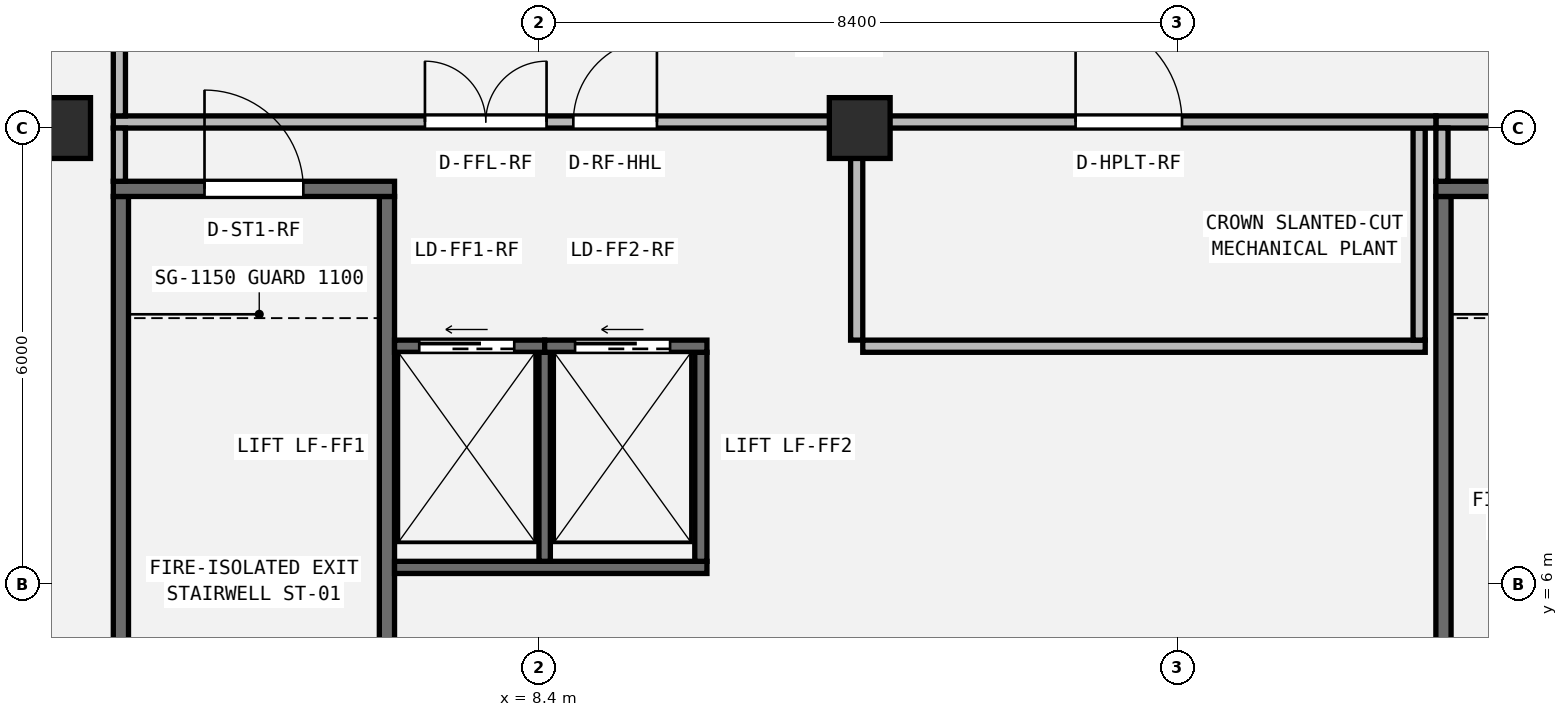
"""IFC4 building model, lengths in metres.
Left out: names, types, materials, properties, quantities, classifications, styles, units other than length and angle.
Written with IfcOpenShell. Run it as: python <this file> out.ifc"""

import sys

from ifc_helpers import new_model, si_unit, direction, frame, frame_2d, origin, origin_2d, place, context, subcontext, project, spatial, rectangle, extrude, element, fill, save


model = new_model("IFC4")
c1 = context("Model", 3, precision=1e-05, world=origin(), true_north=direction((0.0, 1.0)))
c2 = subcontext(c1, "Body", "Model", "MODEL_VIEW")
j1 = project(units=[si_unit("LENGTHUNIT", "METRE"), si_unit("PLANEANGLEUNIT", "RADIAN")], contexts=[c1])
p1 = place(None, origin())
s1 = spatial("IfcSite", under=j1, at=p1, CompositionType="ELEMENT")
p2 = place(p1, origin())
s2 = spatial("IfcBuilding", under=s1, at=p2, CompositionType="ELEMENT")
p3 = place(p2, frame((0.0, 0.0, 309.2)))
s3 = spatial("IfcBuildingStorey", under=s2, at=p3, CompositionType="ELEMENT", Elevation=309.2)
p4 = place(p3, frame((2.1, 12.0, 0.0), z_axis=(0.0, 0.0, 1.0), x_axis=(1.0, 0.0, 0.0)))
e1 = element("IfcColumn", 1, at=p4, inside=s3, PredefinedType="COLUMN", context=c2, shape_type="SweptSolid", body=[
    extrude(rectangle(XDim=0.8, YDim=0.8, at=origin_2d()), origin(), (0.0, 0.0, 1.0), 14.876),
])
p5 = place(p3, frame((12.62, 12.0, 0.0), z_axis=(0.0, 0.0, 1.0), x_axis=(1.0, 0.0, 0.0)))
e2 = element("IfcColumn", 2, at=p5, inside=s3, PredefinedType="COLUMN", context=c2, shape_type="SweptSolid", body=[
    extrude(rectangle(XDim=0.8, YDim=0.8, at=origin_2d()), origin(), (0.0, 0.0, 1.0), 11.551),
])
for number, where, z_axis, x_axis in (
    (3, (2.9, 3.5, 0.0), (0.0, 0.0, 1.0), (0.0, 1.0, 0.0)),
    (4, (6.4, 3.5, 0.0), (0.0, 0.0, 1.0), (0.0, 1.0, 0.0)),
):
    element("IfcWall", number, at=place(p3, frame(where, z_axis=z_axis, x_axis=x_axis)), inside=s3, PredefinedType="SHEAR", context=c2, shape_type="SweptSolid", body=[
        extrude(rectangle(XDim=7.6, YDim=0.2, at=frame_2d((3.8, 0.0))), origin(), (0.0, 0.0, 1.0), 3.8),
    ])
p6 = place(p3, frame((2.8, 11.2, 0.0), z_axis=(0.0, 0.0, 1.0), x_axis=(1.0, 0.0, 0.0)))
e5 = element("IfcWall", 5, at=p6, inside=s3, PredefinedType="SHEAR", context=c2, shape_type="SweptSolid", body=[
    extrude(rectangle(XDim=3.7, YDim=0.2, at=frame_2d((1.85, 0.0))), origin(), (0.0, 0.0, 1.0), 3.8),
])
p7 = place(p6, frame((1.2, 0.0, 0.0)))
e6 = element("IfcOpeningElement", 6, at=p7, cuts=e5, PredefinedType="OPENING", context=c2, shape_type="SweptSolid", body=[
    extrude(rectangle(XDim=1.3, YDim=2.15, at=frame_2d((0.65, 1.075))), frame((0.0, 0.11, 0.0), z_axis=(0.0, -1.0, 0.0), x_axis=(1.0, 0.0, 0.0)), (0.0, 0.0, 1.0), 0.22),
])
p8 = place(p3, frame((20.3, 3.5, 0.0), z_axis=(0.0, 0.0, 1.0), x_axis=(0.0, 1.0, 0.0)))
e7 = element("IfcWall", 7, at=p8, inside=s3, PredefinedType="SHEAR", context=c2, shape_type="SweptSolid", body=[
    extrude(rectangle(XDim=7.6, YDim=0.2, at=frame_2d((3.8, 0.0))), origin(), (0.0, 0.0, 1.0), 3.8),
])
p9 = place(p3, frame((20.2, 11.2, 0.0), z_axis=(0.0, 0.0, 1.0), x_axis=(1.0, 0.0, 0.0)))
e8 = element("IfcWall", 8, at=p9, inside=s3, PredefinedType="SHEAR", context=c2, shape_type="SweptSolid", body=[
    extrude(rectangle(XDim=3.7, YDim=0.2, at=frame_2d((1.85, 0.0))), origin(), (0.0, 0.0, 1.0), 3.8),
])
p10 = place(p9, frame((1.2, 0.0, 0.0)))
e9 = element("IfcOpeningElement", 9, at=p10, cuts=e8, PredefinedType="OPENING", context=c2, shape_type="SweptSolid", body=[
    extrude(rectangle(XDim=1.3, YDim=2.15, at=frame_2d((0.65, 1.075))), frame((0.0, 0.11, 0.0), z_axis=(0.0, -1.0, 0.0), x_axis=(1.0, 0.0, 0.0)), (0.0, 0.0, 1.0), 0.22),
])
p11 = place(p3, frame((6.5, 6.22, 0.0), z_axis=(0.0, 0.0, 1.0), x_axis=(1.0, 0.0, 0.0)))
e10 = element("IfcWall", 10, at=p11, inside=s3, PredefinedType="SHEAR", context=c2, shape_type="SweptSolid", body=[
    extrude(rectangle(XDim=4.11, YDim=0.16, at=frame_2d((2.055, 0.0))), origin(), (0.0, 0.0, 1.0), 3.8),
])
p12 = place(p3, frame((10.53, 6.3, 0.0), z_axis=(0.0, 0.0, 1.0), x_axis=(0.0, 1.0, 0.0)))
e11 = element("IfcWall", 11, at=p12, inside=s3, PredefinedType="SHEAR", context=c2, shape_type="SweptSolid", body=[
    extrude(rectangle(XDim=2.75, YDim=0.16, at=frame_2d((1.375, 0.0))), origin(), (0.0, 0.0, 1.0), 3.8),
])
p13 = place(p3, frame((8.475, 6.3, 0.0), z_axis=(0.0, 0.0, 1.0), x_axis=(0.0, 1.0, 0.0)))
e12 = element("IfcWall", 12, at=p13, inside=s3, PredefinedType="SHEAR", context=c2, shape_type="SweptSolid", body=[
    extrude(rectangle(XDim=2.75, YDim=0.15, at=frame_2d((1.375, 0.0))), origin(), (0.0, 0.0, 1.0), 3.8),
])
p14 = place(p3, frame((6.5, 9.13, 0.0), z_axis=(0.0, 0.0, 1.0), x_axis=(1.0, 0.0, 0.0)))
e13 = element("IfcWall", 13, at=p14, inside=s3, PredefinedType="SHEAR", context=c2, shape_type="SweptSolid", body=[
    extrude(rectangle(XDim=1.975, YDim=0.16, at=frame_2d((0.988, 0.0))), origin(), (0.0, 0.0, 1.0), 3.8),
])
p15 = place(p14, frame((0.325, 0.0, 0.0)))
e14 = element("IfcOpeningElement", 14, at=p15, cuts=e13, PredefinedType="OPENING", context=c2, shape_type="SweptSolid", body=[
    extrude(rectangle(XDim=1.25, YDim=2.15, at=frame_2d((0.625, 1.075))), frame((0.0, 0.09, 0.0), z_axis=(0.0, -1.0, 0.0), x_axis=(1.0, 0.0, 0.0)), (0.0, 0.0, 1.0), 0.18),
])
p16 = place(p3, frame((8.475, 9.13, 0.0), z_axis=(0.0, 0.0, 1.0), x_axis=(1.0, 0.0, 0.0)))
e15 = element("IfcWall", 15, at=p16, inside=s3, PredefinedType="SHEAR", context=c2, shape_type="SweptSolid", body=[
    extrude(rectangle(XDim=2.135, YDim=0.16, at=frame_2d((1.067, 0.0))), origin(), (0.0, 0.0, 1.0), 3.8),
])
p17 = place(p16, frame((0.4, 0.0, 0.0)))
e16 = element("IfcOpeningElement", 16, at=p17, cuts=e15, PredefinedType="OPENING", context=c2, shape_type="SweptSolid", body=[
    extrude(rectangle(XDim=1.25, YDim=2.15, at=frame_2d((0.625, 1.075))), frame((0.0, 0.09, 0.0), z_axis=(0.0, -1.0, 0.0), x_axis=(1.0, 0.0, 0.0)), (0.0, 0.0, 1.0), 0.18),
])
p18 = place(p3, frame((2.8, 12.08, 0.0), z_axis=(0.0, 0.0, 1.0), x_axis=(1.0, 0.0, 0.0)))
e17 = element("IfcWall", 17, at=p18, inside=s3, PredefinedType="PARTITIONING", context=c2, shape_type="SweptSolid", body=[
    extrude(rectangle(XDim=9.86, YDim=0.16, at=frame_2d((4.93, 0.0))), origin(), (0.0, 0.0, 1.0), 3.8),
])
p19 = place(p18, frame((4.1, 0.0, 0.0)))
e18 = element("IfcOpeningElement", 18, at=p19, cuts=e17, PredefinedType="OPENING", context=c2, shape_type="SweptSolid", body=[
    extrude(rectangle(XDim=1.6, YDim=2.05, at=frame_2d((0.8, 1.025))), frame((0.0, 0.09, 0.0), z_axis=(0.0, -1.0, 0.0), x_axis=(1.0, 0.0, 0.0)), (0.0, 0.0, 1.0), 0.18),
])
p20 = place(p18, frame((6.052, 0.0, 0.0)))
e19 = element("IfcOpeningElement", 19, at=p20, cuts=e17, PredefinedType="OPENING", context=c2, shape_type="SweptSolid", body=[
    extrude(rectangle(XDim=1.1, YDim=2.1, at=frame_2d((0.55, 1.05))), frame((0.0, 0.09, 0.0), z_axis=(0.0, -1.0, 0.0), x_axis=(1.0, 0.0, 0.0)), (0.0, 0.0, 1.0), 0.18),
])
p21 = place(p3, frame((2.88, 11.3, 0.0), z_axis=(0.0, 0.0, 1.0), x_axis=(0.0, 1.0, 0.0)))
e20 = element("IfcWall", 20, at=p21, inside=s3, PredefinedType="PARTITIONING", context=c2, shape_type="SweptSolid", body=[
    extrude(rectangle(XDim=0.7, YDim=0.16, at=frame_2d((0.35, 0.0))), origin(), (0.0, 0.0, 1.0), 3.8),
])
p22 = place(p3, frame((12.58, 9.21, 0.0), z_axis=(0.0, 0.0, 1.0), x_axis=(0.0, 1.0, 0.0)))
e21 = element("IfcWall", 21, at=p22, inside=s3, PredefinedType="PARTITIONING", context=c2, shape_type="SweptSolid", body=[
    extrude(rectangle(XDim=2.79, YDim=0.16, at=frame_2d((1.395, 0.0))), origin(), (0.0, 0.0, 1.0), 3.8),
])
p23 = place(p3, frame((20.2, 12.08, 0.0), z_axis=(0.0, 0.0, 1.0), x_axis=(1.0, 0.0, 0.0)))
e22 = element("IfcWall", 22, at=p23, inside=s3, PredefinedType="PARTITIONING", context=c2, shape_type="SweptSolid", body=[
    extrude(rectangle(XDim=3.7, YDim=0.16, at=frame_2d((1.85, 0.0))), origin(), (0.0, 0.0, 1.0), 3.8),
])
p24 = place(p23, frame((1.05, 0.0, 0.0)))
e23 = element("IfcOpeningElement", 23, at=p24, cuts=e22, PredefinedType="OPENING", context=c2, shape_type="SweptSolid", body=[
    extrude(rectangle(XDim=1.6, YDim=2.05, at=frame_2d((0.8, 1.025))), frame((0.0, 0.09, 0.0), z_axis=(0.0, -1.0, 0.0), x_axis=(1.0, 0.0, 0.0)), (0.0, 0.0, 1.0), 0.18),
])
p25 = place(p3, frame((20.28, 11.3, 0.0), z_axis=(0.0, 0.0, 1.0), x_axis=(0.0, 1.0, 0.0)))
e24 = element("IfcWall", 24, at=p25, inside=s3, PredefinedType="PARTITIONING", context=c2, shape_type="SweptSolid", body=[
    extrude(rectangle(XDim=0.7, YDim=0.16, at=frame_2d((0.35, 0.0))), origin(), (0.0, 0.0, 1.0), 3.8),
])
p26 = place(p3, frame((2.88, 12.16, 0.0), z_axis=(0.0, 0.0, 1.0), x_axis=(0.0, 1.0, 0.0)))
e25 = element("IfcWall", 25, at=p26, inside=s3, PredefinedType="PARTITIONING", context=c2, shape_type="SweptSolid", body=[
    extrude(rectangle(XDim=1.36, YDim=0.16, at=frame_2d((0.68, 0.0))), origin(), (0.0, 0.0, 1.0), 3.8),
])
p27 = place(p3, frame((12.66, 9.13, 0.0), z_axis=(0.0, 0.0, 1.0), x_axis=(1.0, 0.0, 0.0)))
e26 = element("IfcWall", 26, at=p27, inside=s3, PredefinedType="PARTITIONING", context=c2, shape_type="SweptSolid", body=[
    extrude(rectangle(XDim=7.4, YDim=0.16, at=frame_2d((3.7, 0.0))), origin(), (0.0, 0.0, 1.0), 3.8),
])
p28 = place(p3, frame((19.98, 9.21, 0.0), z_axis=(0.0, 0.0, 1.0), x_axis=(0.0, 1.0, 0.0)))
e27 = element("IfcWall", 27, at=p28, inside=s3, PredefinedType="PARTITIONING", context=c2, shape_type="SweptSolid", body=[
    extrude(rectangle(XDim=2.79, YDim=0.16, at=frame_2d((1.395, 0.0))), origin(), (0.0, 0.0, 1.0), 3.8),
])
p29 = place(p3, frame((12.66, 12.08, 0.0), z_axis=(0.0, 0.0, 1.0), x_axis=(1.0, 0.0, 0.0)))
e28 = element("IfcWall", 28, at=p29, inside=s3, PredefinedType="PARTITIONING", context=c2, shape_type="SweptSolid", body=[
    extrude(rectangle(XDim=7.54, YDim=0.16, at=frame_2d((3.77, 0.0))), origin(), (0.0, 0.0, 1.0), 3.8),
])
p30 = place(p29, frame((2.8, 0.0, 0.0)))
e29 = element("IfcOpeningElement", 29, at=p30, cuts=e28, PredefinedType="OPENING", context=c2, shape_type="SweptSolid", body=[
    extrude(rectangle(XDim=1.4, YDim=2.15, at=frame_2d((0.7, 1.075))), frame((0.0, 0.09, 0.0), z_axis=(0.0, -1.0, 0.0), x_axis=(1.0, 0.0, 0.0)), (0.0, 0.0, 1.0), 0.18),
])
p31 = place(p7, origin())
e30 = element("IfcDoor", 30, at=p31, inside=s3, OperationType="SINGLE_SWING_LEFT", PredefinedType="DOOR", context=c2, shape_type="SweptSolid", body=[
    extrude(rectangle(XDim=1.3, YDim=2.15, at=frame_2d((0.65, 1.075))), frame((0.0, 0.025, 0.0), z_axis=(0.0, -1.0, 0.0), x_axis=(1.0, 0.0, 0.0)), (0.0, 0.0, 1.0), 0.05),
])
fill(e6, e30)
p32 = place(p15, origin())
e31 = element("IfcDoor", 31, at=p32, inside=s3, OperationType="SLIDING_TO_LEFT", PredefinedType="DOOR", context=c2, shape_type="SweptSolid", body=[
    extrude(rectangle(XDim=1.25, YDim=2.15, at=frame_2d((0.625, 1.075))), frame((0.0, 0.025, 0.0), z_axis=(0.0, -1.0, 0.0), x_axis=(1.0, 0.0, 0.0)), (0.0, 0.0, 1.0), 0.05),
])
fill(e14, e31)
p33 = place(p17, origin())
e32 = element("IfcDoor", 32, at=p33, inside=s3, OperationType="SLIDING_TO_LEFT", PredefinedType="DOOR", context=c2, shape_type="SweptSolid", body=[
    extrude(rectangle(XDim=1.25, YDim=2.15, at=frame_2d((0.625, 1.075))), frame((0.0, 0.025, 0.0), z_axis=(0.0, -1.0, 0.0), x_axis=(1.0, 0.0, 0.0)), (0.0, 0.0, 1.0), 0.05),
])
fill(e16, e32)
p34 = place(p19, origin())
e33 = element("IfcDoor", 33, at=p34, inside=s3, OperationType="DOUBLE_DOOR_SINGLE_SWING", PredefinedType="DOOR", context=c2, shape_type="SweptSolid", body=[
    extrude(rectangle(XDim=1.6, YDim=2.05, at=frame_2d((0.8, 1.025))), frame((0.0, 0.025, 0.0), z_axis=(0.0, -1.0, 0.0), x_axis=(1.0, 0.0, 0.0)), (0.0, 0.0, 1.0), 0.05),
])
fill(e18, e33)
p35 = place(p30, origin())
e34 = element("IfcDoor", 34, at=p35, inside=s3, OperationType="SINGLE_SWING_LEFT", PredefinedType="DOOR", context=c2, shape_type="SweptSolid", body=[
    extrude(rectangle(XDim=1.4, YDim=2.15, at=frame_2d((0.7, 1.075))), frame((0.0, 0.025, 0.0), z_axis=(0.0, -1.0, 0.0), x_axis=(1.0, 0.0, 0.0)), (0.0, 0.0, 1.0), 0.05),
])
fill(e29, e34)
p36 = place(p20, origin())
e35 = element("IfcDoor", 35, at=p36, inside=s3, OperationType="SINGLE_SWING_RIGHT", PredefinedType="DOOR", context=c2, shape_type="SweptSolid", body=[
    extrude(rectangle(XDim=1.1, YDim=2.1, at=frame_2d((0.55, 1.05))), frame((0.0, 0.025, 0.0), z_axis=(0.0, -1.0, 0.0), x_axis=(1.0, 0.0, 0.0)), (0.0, 0.0, 1.0), 0.05),
])
fill(e19, e35)
save(model, sys.argv[1])
